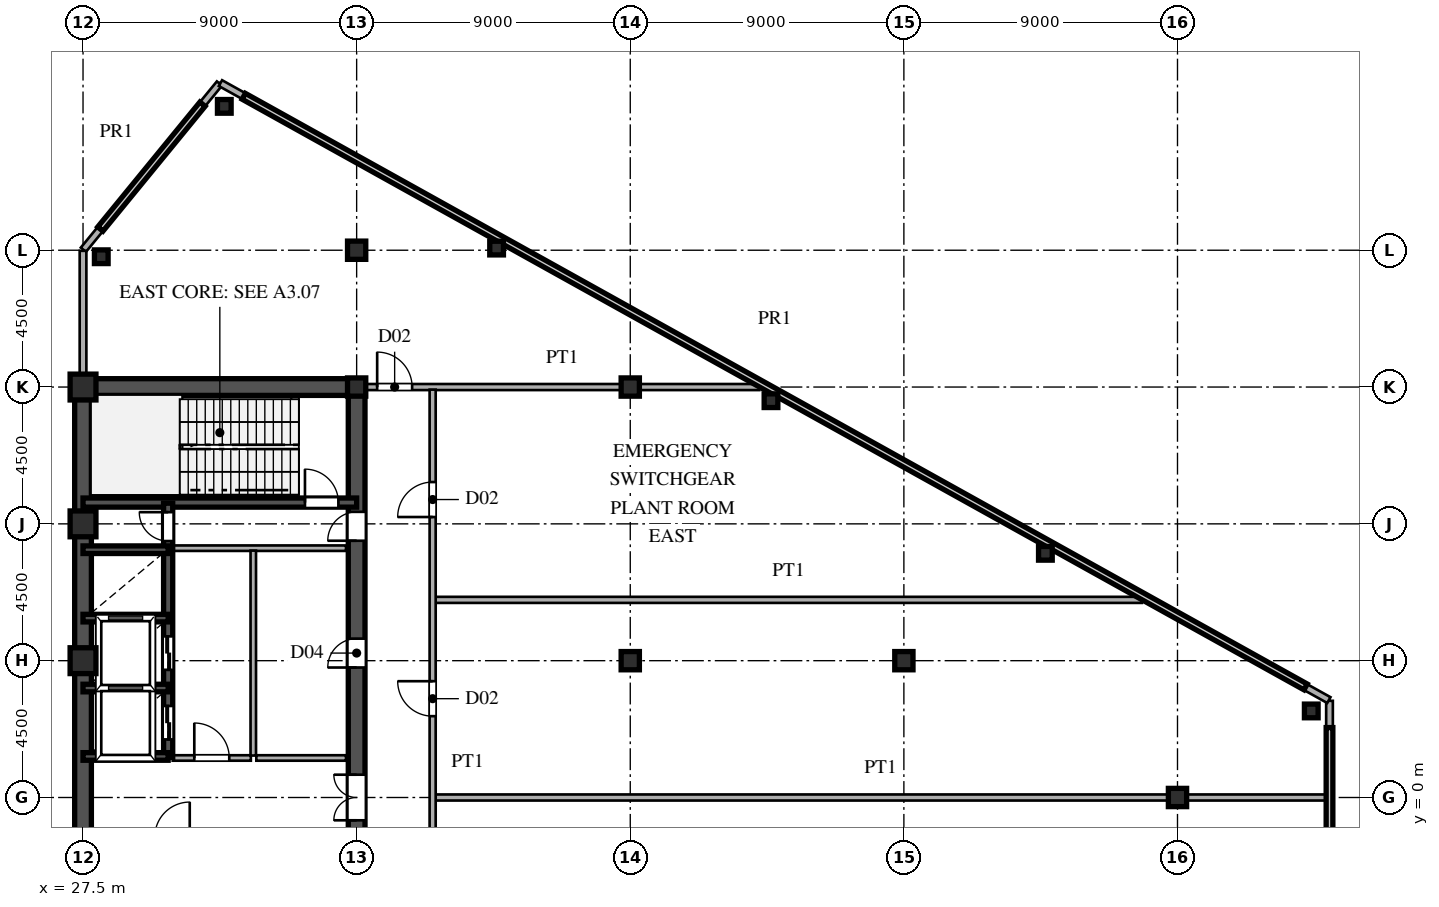
"""IFC4 building model, lengths in metres.
Left out: names, types, materials, properties, quantities, classifications, styles, units other than length and angle.
Written with IfcOpenShell. Run it as: python <this file> out.ifc"""

import sys

from ifc_helpers import new_model, si_unit, direction, frame, frame_2d, origin, origin_2d, place, context, subcontext, project, spatial, rectangle, hollow_rectangle, i_section, extrude, source, transform, mapped, element, fill, save


model = new_model("IFC4")
c1 = context("Model", 3, precision=1e-05, world=origin(), true_north=direction((0.0, 1.0)))
c2 = subcontext(c1, "Body", "Model", "MODEL_VIEW")
j1 = project(units=[si_unit("LENGTHUNIT", "METRE"), si_unit("PLANEANGLEUNIT", "RADIAN")], contexts=[c1])
p1 = place(None, origin())
s1 = spatial("IfcSite", under=j1, at=p1, CompositionType="ELEMENT")
p2 = place(p1, origin())
s2 = spatial("IfcBuilding", under=s1, at=p2, CompositionType="ELEMENT")
p3 = place(p2, frame((0.0, 0.0, 162.0)))
s3 = spatial("IfcBuildingStorey", under=s2, at=p3, CompositionType="ELEMENT", Elevation=162.0)
m1 = source(origin(), c2, "Body", "SweptSolid", [
    extrude(hollow_rectangle(XDim=0.85, YDim=0.85, WallThickness=0.036, at=origin_2d()), origin(), (0.0, 0.0, 1.0), 5.1),
])
for number, where, z_axis, x_axis in (
    (1, (27.5, 4.5, 0.0), (0.0, 0.0, 1.0), (1.0, 0.0, 0.0)),
    (2, (27.5, 9.0, 0.0), (0.0, 0.0, 1.0), (1.0, 0.0, 0.0)),
    (3, (27.5, 13.5, 0.0), (0.0, 0.0, 1.0), (1.0, 0.0, 0.0)),
):
    element("IfcColumn", number, at=place(p3, frame(where, z_axis=z_axis, x_axis=x_axis)), inside=s3, PredefinedType="COLUMN", context=c2, shape_type="MappedRepresentation", body=[
        mapped(m1, transform((0.0, 0.0, 0.0), scale=1.0)),
    ])
m2 = source(origin(), c2, "Body", "SweptSolid", [
    extrude(i_section(OverallWidth=0.6, OverallDepth=0.6, WebThickness=0.025, FlangeThickness=0.04, at=origin_2d()), origin(), (0.0, 0.0, 1.0), 5.1),
])
for number, where, z_axis, x_axis in (
    (4, (36.5, 13.5, 0.0), (0.0, 0.0, 1.0), (1.0, 0.0, 0.0)),
    (5, (36.5, 18.0, 0.0), (0.0, 0.0, 1.0), (1.0, 0.0, 0.0)),
    (6, (45.5, 4.5, 0.0), (0.0, 0.0, 1.0), (1.0, 0.0, 0.0)),
    (7, (45.5, 13.5, 0.0), (0.0, 0.0, 1.0), (1.0, 0.0, 0.0)),
    (8, (54.5, 4.5, 0.0), (0.0, 0.0, 1.0), (1.0, 0.0, 0.0)),
    (9, (63.5, 0.0, 0.0), (0.0, 0.0, 1.0), (1.0, 0.0, 0.0)),
):
    element("IfcColumn", number, at=place(p3, frame(where, z_axis=z_axis, x_axis=x_axis)), inside=s3, PredefinedType="COLUMN", context=c2, shape_type="MappedRepresentation", body=[
        mapped(m2, transform((0.0, 0.0, 0.0), scale=1.0)),
    ])
m3 = source(origin(), c2, "Body", "SweptSolid", [
    extrude(hollow_rectangle(XDim=0.45, YDim=0.45, WallThickness=0.018, at=origin_2d()), origin(), (0.0, 0.0, 1.0), 5.1),
])
for number, where, z_axis, x_axis in (
    (10, (67.9, 2.847, 0.0), (0.0, 0.0, 1.0), (1.0, 0.0, 0.0)),
    (11, (32.147, 22.732, 0.0), (0.0, 0.0, 1.0), (1.0, 0.0, 0.0)),
    (12, (28.1, 17.786, 0.0), (0.0, 0.0, 1.0), (1.0, 0.0, 0.0)),
    (13, (41.104, 18.071, 0.0), (0.0, 0.0, 1.0), (1.0, 0.0, 0.0)),
    (14, (50.129, 13.051, 0.0), (0.0, 0.0, 1.0), (1.0, 0.0, 0.0)),
    (15, (59.155, 8.031, 0.0), (0.0, 0.0, 1.0), (1.0, 0.0, 0.0)),
):
    element("IfcColumn", number, at=place(p3, frame(where, z_axis=z_axis, x_axis=x_axis)), inside=s3, PredefinedType="COLUMN", context=c2, shape_type="MappedRepresentation", body=[
        mapped(m3, transform((0.0, 0.0, 0.0), scale=1.0)),
    ])
p4 = place(p3, frame((68.5, -3.18, 0.0), z_axis=(0.0, 0.0, 1.0), x_axis=(0.0, 1.0, 0.0)))
e16 = element("IfcWall", 16, at=p4, inside=s3, PredefinedType="PARAPET", context=c2, shape_type="SweptSolid", body=[
    extrude(rectangle(XDim=6.36, YDim=0.22, at=frame_2d((3.18, 0.0))), origin(), (0.0, 0.0, 1.0), 1.25),
])
p5 = place(p3, frame((68.482, 3.21, 0.0), z_axis=(0.0, 0.0, 1.0), x_axis=(-0.873930586172, 0.486050748947, 0.0)))
e17 = element("IfcWall", 17, at=p5, inside=s3, PredefinedType="PARAPET", context=c2, shape_type="SweptSolid", body=[
    extrude(rectangle(XDim=41.725, YDim=0.22, at=frame_2d((20.863, 0.0))), origin(), (0.0, 0.0, 1.0), 1.25),
])
p6 = place(p3, frame((31.987, 23.485, 0.0), z_axis=(0.0, 0.0, 1.0), x_axis=(-0.633218976113, -0.773972692213, 0.0)))
e18 = element("IfcWall", 18, at=p6, inside=s3, PredefinedType="PARAPET", context=c2, shape_type="SweptSolid", body=[
    extrude(rectangle(XDim=7.066, YDim=0.22, at=frame_2d((3.533, 0.0))), origin(), (0.0, 0.0, 1.0), 1.25),
])
p7 = place(p3, frame((27.5, 13.52, 0.0), z_axis=(0.0, 0.0, 1.0), x_axis=(0.0, 1.0, 0.0)))
e19 = element("IfcWall", 19, at=p7, inside=s3, PredefinedType="PARAPET", context=c2, shape_type="SweptSolid", body=[
    extrude(rectangle(XDim=4.46, YDim=0.22, at=frame_2d((2.23, 0.0))), origin(), (0.0, 0.0, 1.0), 1.25),
])
p8 = place(p3, frame((27.5, 1.3, 0.0), z_axis=(0.0, 0.0, 1.0), x_axis=(0.0, 1.0, 0.0)))
e20 = element("IfcWall", 20, at=p8, inside=s3, PredefinedType="SHEAR", context=c2, shape_type="SweptSolid", body=[
    extrude(rectangle(XDim=12.2, YDim=0.55, at=frame_2d((6.1, 0.0))), origin(), (0.0, 0.0, 1.0), 4.88),
])
p9 = place(p3, frame((27.5, -1.3, 0.0), z_axis=(0.0, 0.0, 1.0), x_axis=(0.0, 1.0, 0.0)))
e21 = element("IfcWall", 21, at=p9, inside=s3, PredefinedType="SHEAR", context=c2, shape_type="SweptSolid", body=[
    extrude(rectangle(XDim=2.6, YDim=0.55, at=frame_2d((1.3, 0.0))), origin(), (0.0, 0.0, 1.0), 4.88),
])
p10 = place(p3, frame((27.5, 13.5, 0.0), z_axis=(0.0, 0.0, 1.0), x_axis=(1.0, 0.0, 0.0)))
e22 = element("IfcWall", 22, at=p10, inside=s3, PredefinedType="SHEAR", context=c2, shape_type="SweptSolid", body=[
    extrude(rectangle(XDim=9.0, YDim=0.55, at=frame_2d((4.5, 0.0))), origin(), (0.0, 0.0, 1.0), 4.88),
])
p11 = place(p3, frame((36.5, -1.3, 0.0), z_axis=(0.0, 0.0, 1.0), x_axis=(0.0, 1.0, 0.0)))
e23 = element("IfcWall", 23, at=p11, inside=s3, PredefinedType="SHEAR", context=c2, shape_type="SweptSolid", body=[
    extrude(rectangle(XDim=2.6, YDim=0.55, at=frame_2d((1.3, 0.0))), origin(), (0.0, 0.0, 1.0), 4.88),
])
p12 = place(p11, frame((0.55, 0.0, 0.0)))
e24 = element("IfcOpeningElement", 24, at=p12, cuts=e23, PredefinedType="OPENING", context=c2, shape_type="SweptSolid", body=[
    extrude(rectangle(XDim=1.5, YDim=2.3, at=frame_2d((0.75, 1.15))), frame((0.0, 0.285, 0.0), z_axis=(0.0, -1.0, 0.0), x_axis=(1.0, 0.0, 0.0)), (0.0, 0.0, 1.0), 0.57),
])
p13 = place(p3, frame((36.5, 8.2, 0.0), z_axis=(0.0, 0.0, 1.0), x_axis=(0.0, 1.0, 0.0)))
e25 = element("IfcWall", 25, at=p13, inside=s3, PredefinedType="SHEAR", context=c2, shape_type="SweptSolid", body=[
    extrude(rectangle(XDim=5.45, YDim=0.55, at=frame_2d((2.725, 0.0))), origin(), (0.0, 0.0, 1.0), 4.88),
])
p14 = place(p13, frame((0.245, 0.0, 0.0)))
e26 = element("IfcOpeningElement", 26, at=p14, cuts=e25, PredefinedType="OPENING", context=c2, shape_type="SweptSolid", body=[
    extrude(rectangle(XDim=0.95, YDim=2.15, at=frame_2d((0.475, 1.075))), frame((0.0, 0.285, 0.0), z_axis=(0.0, -1.0, 0.0), x_axis=(1.0, 0.0, 0.0)), (0.0, 0.0, 1.0), 0.57),
])
p15 = place(p3, frame((36.5, 1.3, 0.0), z_axis=(0.0, 0.0, 1.0), x_axis=(0.0, 1.0, 0.0)))
e27 = element("IfcWall", 27, at=p15, inside=s3, PredefinedType="SHEAR", context=c2, shape_type="SweptSolid", body=[
    extrude(rectangle(XDim=6.9, YDim=0.55, at=frame_2d((3.45, 0.0))), origin(), (0.0, 0.0, 1.0), 4.88),
])
p16 = place(p15, frame((2.975, 0.0, 0.0)))
e28 = element("IfcOpeningElement", 28, at=p16, cuts=e27, PredefinedType="OPENING", context=c2, shape_type="SweptSolid", body=[
    extrude(rectangle(XDim=0.95, YDim=2.15, at=frame_2d((0.475, 1.075))), frame((0.0, 0.285, 0.0), z_axis=(0.0, -1.0, 0.0), x_axis=(1.0, 0.0, 0.0)), (0.0, 0.0, 1.0), 0.57),
])
p17 = place(p3, frame((27.5, 9.7, 0.0), z_axis=(0.0, 0.0, 1.0), x_axis=(1.0, 0.0, 0.0)))
e29 = element("IfcWall", 29, at=p17, inside=s3, PredefinedType="SHEAR", context=c2, shape_type="SweptSolid", body=[
    extrude(rectangle(XDim=9.0, YDim=0.3, at=frame_2d((4.5, 0.0))), origin(), (0.0, 0.0, 1.0), 4.88),
])
p18 = place(p17, frame((7.3, 0.0, 0.0)))
e30 = element("IfcOpeningElement", 30, at=p18, cuts=e29, PredefinedType="OPENING", context=c2, shape_type="SweptSolid", body=[
    extrude(rectangle(XDim=1.1, YDim=2.2, at=frame_2d((0.55, 1.1))), frame((0.0, 0.16, 0.0), z_axis=(0.0, -1.0, 0.0), x_axis=(1.0, 0.0, 0.0)), (0.0, 0.0, 1.0), 0.32),
])
for number, where, z_axis, x_axis in (
    (31, (27.5, 1.35, 0.0), (0.0, 0.0, 1.0), (1.0, 0.0, 0.0)),
    (32, (27.5, 3.6, 0.0), (0.0, 0.0, 1.0), (1.0, 0.0, 0.0)),
    (33, (27.5, 5.9, 0.0), (0.0, 0.0, 1.0), (1.0, 0.0, 0.0)),
    (34, (27.5, 8.15, 0.0), (0.0, 0.0, 1.0), (1.0, 0.0, 0.0)),
):
    element("IfcWall", number, at=place(p3, frame(where, z_axis=z_axis, x_axis=x_axis)), inside=s3, PredefinedType="SHEAR", context=c2, shape_type="SweptSolid", body=[
        extrude(rectangle(XDim=2.8, YDim=0.25, at=frame_2d((1.4, 0.0))), origin(), (0.0, 0.0, 1.0), 4.88),
    ])
p19 = place(p3, frame((30.3, 1.32, 0.0), z_axis=(0.0, 0.0, 1.0), x_axis=(0.0, 1.0, 0.0)))
e35 = element("IfcWall", 35, at=p19, inside=s3, PredefinedType="SHEAR", context=c2, shape_type="SweptSolid", body=[
    extrude(rectangle(XDim=2.28, YDim=0.3, at=frame_2d((1.14, 0.0))), origin(), (0.0, 0.0, 1.0), 4.88),
])
p20 = place(p19, frame((0.59, 0.0, 0.0)))
e36 = element("IfcOpeningElement", 36, at=p20, cuts=e35, PredefinedType="OPENING", context=c2, shape_type="SweptSolid", body=[
    extrude(rectangle(XDim=1.1, YDim=2.2, at=frame_2d((0.55, 1.1))), frame((0.0, 0.16, 0.0), z_axis=(0.0, -1.0, 0.0), x_axis=(1.0, 0.0, 0.0)), (0.0, 0.0, 1.0), 0.32),
])
p21 = place(p3, frame((30.3, 3.6, 0.0), z_axis=(0.0, 0.0, 1.0), x_axis=(0.0, 1.0, 0.0)))
e37 = element("IfcWall", 37, at=p21, inside=s3, PredefinedType="SHEAR", context=c2, shape_type="SweptSolid", body=[
    extrude(rectangle(XDim=2.3, YDim=0.3, at=frame_2d((1.15, 0.0))), origin(), (0.0, 0.0, 1.0), 4.88),
])
p22 = place(p21, frame((0.6, 0.0, 0.0)))
e38 = element("IfcOpeningElement", 38, at=p22, cuts=e37, PredefinedType="OPENING", context=c2, shape_type="SweptSolid", body=[
    extrude(rectangle(XDim=1.1, YDim=2.2, at=frame_2d((0.55, 1.1))), frame((0.0, 0.16, 0.0), z_axis=(0.0, -1.0, 0.0), x_axis=(1.0, 0.0, 0.0)), (0.0, 0.0, 1.0), 0.32),
])
p23 = place(p3, frame((30.3, 5.9, 0.0), z_axis=(0.0, 0.0, 1.0), x_axis=(0.0, 1.0, 0.0)))
e39 = element("IfcWall", 39, at=p23, inside=s3, PredefinedType="SHEAR", context=c2, shape_type="SweptSolid", body=[
    extrude(rectangle(XDim=2.25, YDim=0.3, at=frame_2d((1.125, 0.0))), origin(), (0.0, 0.0, 1.0), 4.88),
])
p24 = place(p3, frame((30.3, 8.15, 0.0), z_axis=(0.0, 0.0, 1.0), x_axis=(0.0, 1.0, 0.0)))
e40 = element("IfcWall", 40, at=p24, inside=s3, PredefinedType="SHEAR", context=c2, shape_type="SweptSolid", body=[
    extrude(rectangle(XDim=1.53, YDim=0.3, at=frame_2d((0.765, 0.0))), origin(), (0.0, 0.0, 1.0), 4.88),
])
p25 = place(p24, frame((0.285, 0.0, 0.0)))
e41 = element("IfcOpeningElement", 41, at=p25, cuts=e40, PredefinedType="OPENING", context=c2, shape_type="SweptSolid", body=[
    extrude(rectangle(XDim=0.95, YDim=2.15, at=frame_2d((0.475, 1.075))), frame((0.0, 0.16, 0.0), z_axis=(0.0, -1.0, 0.0), x_axis=(1.0, 0.0, 0.0)), (0.0, 0.0, 1.0), 0.32),
])
p26 = place(p3, frame((30.45, 8.2, 0.0), z_axis=(0.0, 0.0, 1.0), x_axis=(1.0, 0.0, 0.0)))
e42 = element("IfcWall", 42, at=p26, inside=s3, PredefinedType="PARTITIONING", context=c2, shape_type="SweptSolid", body=[
    extrude(rectangle(XDim=5.7, YDim=0.18, at=frame_2d((2.85, 0.0))), origin(), (0.0, 0.0, 1.0), 4.88),
])
p27 = place(p3, frame((33.1, 1.38, 0.0), z_axis=(0.0, 0.0, 1.0), x_axis=(0.0, 1.0, 0.0)))
e43 = element("IfcWall", 43, at=p27, inside=s3, PredefinedType="PARTITIONING", context=c2, shape_type="SweptSolid", body=[
    extrude(rectangle(XDim=6.74, YDim=0.18, at=frame_2d((3.37, 0.0))), origin(), (0.0, 0.0, 1.0), 4.88),
])
p28 = place(p3, frame((30.45, 1.3, 0.0), z_axis=(0.0, 0.0, 1.0), x_axis=(1.0, 0.0, 0.0)))
e44 = element("IfcWall", 44, at=p28, inside=s3, PredefinedType="PARTITIONING", context=c2, shape_type="SweptSolid", body=[
    extrude(rectangle(XDim=2.57, YDim=0.18, at=frame_2d((1.285, 0.0))), origin(), (0.0, 0.0, 1.0), 4.88),
])
p29 = place(p28, frame((0.71, 0.0, 0.0)))
e45 = element("IfcOpeningElement", 45, at=p29, cuts=e44, PredefinedType="OPENING", context=c2, shape_type="SweptSolid", body=[
    extrude(rectangle(XDim=1.15, YDim=2.2, at=frame_2d((0.575, 1.1))), frame((0.0, 0.1, 0.0), z_axis=(0.0, -1.0, 0.0), x_axis=(1.0, 0.0, 0.0)), (0.0, 0.0, 1.0), 0.2),
])
p30 = place(p3, frame((33.2, 1.3, 0.0), z_axis=(0.0, 0.0, 1.0), x_axis=(1.0, 0.0, 0.0)))
e46 = element("IfcWall", 46, at=p30, inside=s3, PredefinedType="PARTITIONING", context=c2, shape_type="SweptSolid", body=[
    extrude(rectangle(XDim=2.95, YDim=0.18, at=frame_2d((1.475, 0.0))), origin(), (0.0, 0.0, 1.0), 4.88),
])
p31 = place(p3, frame((39.085, 0.0, 0.0), z_axis=(0.0, 0.0, 1.0), x_axis=(1.0, 0.0, 0.0)))
e47 = element("IfcWall", 47, at=p31, inside=s3, PredefinedType="PARTITIONING", context=c2, shape_type="SweptSolid", body=[
    extrude(rectangle(XDim=29.3, YDim=0.2, at=frame_2d((14.65, 0.0))), origin(), (0.0, 0.0, 1.0), 4.88),
])
p32 = place(p3, frame((39.085, 6.5, 0.0), z_axis=(0.0, 0.0, 1.0), x_axis=(1.0, 0.0, 0.0)))
e48 = element("IfcWall", 48, at=p32, inside=s3, PredefinedType="PARTITIONING", context=c2, shape_type="SweptSolid", body=[
    extrude(rectangle(XDim=23.245, YDim=0.2, at=frame_2d((11.623, 0.0))), origin(), (0.0, 0.0, 1.0), 4.88),
])
p33 = place(p3, frame((36.78, 13.5, 0.0), z_axis=(0.0, 0.0, 1.0), x_axis=(1.0, 0.0, 0.0)))
e49 = element("IfcWall", 49, at=p33, inside=s3, PredefinedType="PARTITIONING", context=c2, shape_type="SweptSolid", body=[
    extrude(rectangle(XDim=10.807, YDim=0.2, at=frame_2d((5.404, 0.0))), origin(), (0.0, 0.0, 1.0), 4.28),
])
p34 = place(p33, frame((0.395, 0.0, 0.0)))
e50 = element("IfcOpeningElement", 50, at=p34, cuts=e49, PredefinedType="OPENING", context=c2, shape_type="SweptSolid", body=[
    extrude(rectangle(XDim=1.15, YDim=2.2, at=frame_2d((0.575, 1.1))), frame((0.0, 0.11, 0.0), z_axis=(0.0, -1.0, 0.0), x_axis=(1.0, 0.0, 0.0)), (0.0, 0.0, 1.0), 0.22),
])
p35 = place(p3, frame((47.587, 13.5, 0.0), z_axis=(0.0, 0.0, 1.0), x_axis=(1.0, 0.0, 0.0)))
e51 = element("IfcWall", 51, at=p35, inside=s3, PredefinedType="PARTITIONING", context=c2, shape_type="SweptSolid", body=[
    extrude(rectangle(XDim=2.156, YDim=0.2, at=frame_2d((1.078, 0.0))), origin(), (0.0, 0.0, 1.0), 4.88),
])
p36 = place(p3, frame((39.0, -13.415, 0.0), z_axis=(0.0, 0.0, 1.0), x_axis=(0.0, 1.0, 0.0)))
e52 = element("IfcWall", 52, at=p36, inside=s3, PredefinedType="PARTITIONING", context=c2, shape_type="SweptSolid", body=[
    extrude(rectangle(XDim=26.83, YDim=0.2, at=frame_2d((13.415, 0.0))), origin(), (0.0, 0.0, 1.0), 4.88),
])
p37 = place(p36, frame((3.29, 0.0, 0.0)))
e53 = element("IfcOpeningElement", 53, at=p37, cuts=e52, PredefinedType="OPENING", context=c2, shape_type="SweptSolid", body=[
    extrude(rectangle(XDim=1.15, YDim=2.2, at=frame_2d((0.575, 1.1))), frame((0.0, 0.11, 0.0), z_axis=(0.0, -1.0, 0.0), x_axis=(1.0, 0.0, 0.0)), (0.0, 0.0, 1.0), 0.22),
])
p38 = place(p36, frame((9.84, 0.0, 0.0)))
e54 = element("IfcOpeningElement", 54, at=p38, cuts=e52, PredefinedType="OPENING", context=c2, shape_type="SweptSolid", body=[
    extrude(rectangle(XDim=1.15, YDim=2.2, at=frame_2d((0.575, 1.1))), frame((0.0, 0.11, 0.0), z_axis=(0.0, -1.0, 0.0), x_axis=(1.0, 0.0, 0.0)), (0.0, 0.0, 1.0), 0.22),
])
p39 = place(p36, frame((16.09, 0.0, 0.0)))
e55 = element("IfcOpeningElement", 55, at=p39, cuts=e52, PredefinedType="OPENING", context=c2, shape_type="SweptSolid", body=[
    extrude(rectangle(XDim=1.15, YDim=2.2, at=frame_2d((0.575, 1.1))), frame((0.0, 0.11, 0.0), z_axis=(0.0, -1.0, 0.0), x_axis=(1.0, 0.0, 0.0)), (0.0, 0.0, 1.0), 0.22),
])
p40 = place(p36, frame((22.64, 0.0, 0.0)))
e56 = element("IfcOpeningElement", 56, at=p40, cuts=e52, PredefinedType="OPENING", context=c2, shape_type="SweptSolid", body=[
    extrude(rectangle(XDim=1.15, YDim=2.2, at=frame_2d((0.575, 1.1))), frame((0.0, 0.11, 0.0), z_axis=(0.0, -1.0, 0.0), x_axis=(1.0, 0.0, 0.0)), (0.0, 0.0, 1.0), 0.22),
])
m4 = source(origin(), c2, "Body", "SweptSolid", [
    extrude(rectangle(XDim=1.5, YDim=2.3, at=frame_2d((0.75, 1.15))), frame((0.0, 0.025, 0.0), z_axis=(0.0, -1.0, 0.0), x_axis=(1.0, 0.0, 0.0)), (0.0, 0.0, 1.0), 0.05),
])
p41 = place(p12, origin())
e57 = element("IfcDoor", 57, at=p41, inside=s3, OperationType="DOUBLE_SWING_LEFT", PredefinedType="DOOR", context=c2, shape_type="MappedRepresentation", body=[
    mapped(m4, transform((0.0, 0.0, 0.0), scale=1.0)),
])
fill(e24, e57)
m5 = source(origin(), c2, "Body", "SweptSolid", [
    extrude(rectangle(XDim=0.95, YDim=2.15, at=frame_2d((0.475, 1.075))), frame((0.0, 0.025, 0.0), z_axis=(0.0, -1.0, 0.0), x_axis=(1.0, 0.0, 0.0)), (0.0, 0.0, 1.0), 0.05),
])
p42 = place(p14, origin())
e58 = element("IfcDoor", 58, at=p42, inside=s3, OperationType="SINGLE_SWING_LEFT", PredefinedType="DOOR", context=c2, shape_type="MappedRepresentation", body=[
    mapped(m5, transform((0.0, 0.0, 0.0), scale=1.0)),
])
fill(e26, e58)
p43 = place(p16, origin())
e59 = element("IfcDoor", 59, at=p43, inside=s3, OperationType="SINGLE_SWING_LEFT", PredefinedType="DOOR", context=c2, shape_type="MappedRepresentation", body=[
    mapped(m5, transform((0.0, 0.0, 0.0), scale=1.0)),
])
fill(e28, e59)
m6 = source(origin(), c2, "Body", "SweptSolid", [
    extrude(rectangle(XDim=1.1, YDim=2.2, at=frame_2d((0.55, 1.1))), frame((0.0, 0.025, 0.0), z_axis=(0.0, -1.0, 0.0), x_axis=(1.0, 0.0, 0.0)), (0.0, 0.0, 1.0), 0.05),
])
p44 = place(p18, origin())
e60 = element("IfcDoor", 60, at=p44, inside=s3, OperationType="SINGLE_SWING_LEFT", PredefinedType="DOOR", context=c2, shape_type="MappedRepresentation", body=[
    mapped(m6, transform((0.0, 0.0, 0.0), scale=1.0)),
])
fill(e30, e60)
m7 = source(origin(), c2, "Body", "SweptSolid", [
    extrude(rectangle(XDim=1.1, YDim=2.2, at=frame_2d((0.55, 1.1))), frame((0.0, 0.025, 0.0), z_axis=(0.0, -1.0, 0.0), x_axis=(1.0, 0.0, 0.0)), (0.0, 0.0, 1.0), 0.05),
])
p45 = place(p20, origin())
e61 = element("IfcDoor", 61, at=p45, inside=s3, OperationType="DOUBLE_DOOR_SLIDING", PredefinedType="DOOR", context=c2, shape_type="MappedRepresentation", body=[
    mapped(m7, transform((0.0, 0.0, 0.0), scale=1.0)),
])
fill(e36, e61)
p46 = place(p22, origin())
e62 = element("IfcDoor", 62, at=p46, inside=s3, OperationType="DOUBLE_DOOR_SLIDING", PredefinedType="DOOR", context=c2, shape_type="MappedRepresentation", body=[
    mapped(m7, transform((0.0, 0.0, 0.0), scale=1.0)),
])
fill(e38, e62)
p47 = place(p25, origin())
e63 = element("IfcDoor", 63, at=p47, inside=s3, OperationType="SINGLE_SWING_RIGHT", PredefinedType="DOOR", context=c2, shape_type="MappedRepresentation", body=[
    mapped(m5, transform((0.0, 0.0, 0.0), scale=1.0)),
])
fill(e41, e63)
m8 = source(origin(), c2, "Body", "SweptSolid", [
    extrude(rectangle(XDim=1.15, YDim=2.2, at=frame_2d((0.575, 1.1))), frame((0.0, 0.025, 0.0), z_axis=(0.0, -1.0, 0.0), x_axis=(1.0, 0.0, 0.0)), (0.0, 0.0, 1.0), 0.05),
])
p48 = place(p29, origin())
e64 = element("IfcDoor", 64, at=p48, inside=s3, OperationType="SINGLE_SWING_LEFT", PredefinedType="DOOR", context=c2, shape_type="MappedRepresentation", body=[
    mapped(m8, transform((0.0, 0.0, 0.0), scale=1.0)),
])
fill(e45, e64)
p49 = place(p34, origin())
e65 = element("IfcDoor", 65, at=p49, inside=s3, OperationType="SINGLE_SWING_LEFT", PredefinedType="DOOR", context=c2, shape_type="MappedRepresentation", body=[
    mapped(m8, transform((0.0, 0.0, 0.0), scale=1.0)),
])
fill(e50, e65)
p50 = place(p39, origin())
e66 = element("IfcDoor", 66, at=p50, inside=s3, OperationType="SINGLE_SWING_RIGHT", PredefinedType="DOOR", context=c2, shape_type="MappedRepresentation", body=[
    mapped(m8, transform((0.0, 0.0, 0.0), scale=1.0)),
])
fill(e55, e66)
p51 = place(p40, origin())
e67 = element("IfcDoor", 67, at=p51, inside=s3, OperationType="SINGLE_SWING_LEFT", PredefinedType="DOOR", context=c2, shape_type="MappedRepresentation", body=[
    mapped(m8, transform((0.0, 0.0, 0.0), scale=1.0)),
])
fill(e56, e67)
save(model, sys.argv[1])
